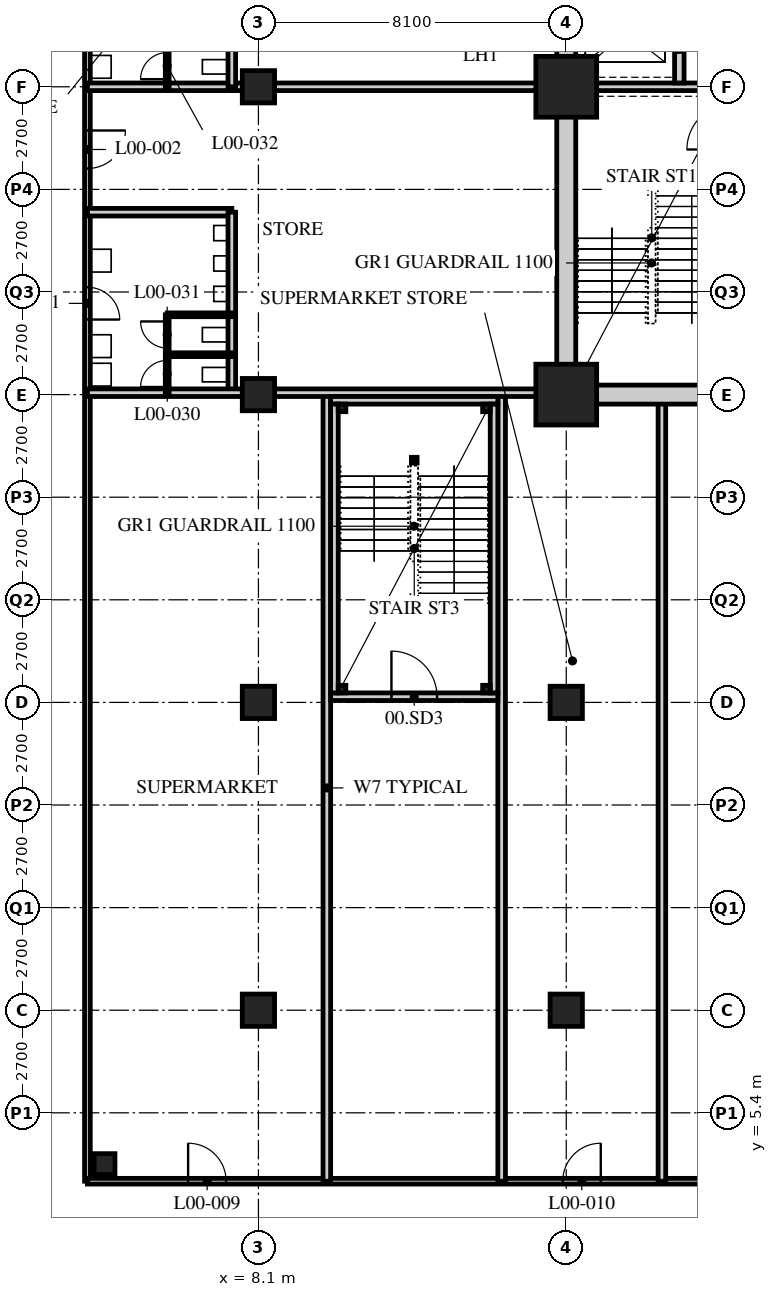
"""IFC4 building model, lengths in metres.
Left out: names, types, materials, properties, quantities, classifications, styles, units other than length and angle.
Written with IfcOpenShell. Run it as: python <this file> out.ifc"""

import sys

from ifc_helpers import new_model, si_unit, direction, frame, frame_2d, origin, origin_2d, place, context, subcontext, project, spatial, rectangle, hollow_rectangle, extrude, element, fill, save


model = new_model("IFC4")
c1 = context("Model", 3, precision=1e-05, world=origin(), true_north=direction((0.0, 1.0)))
c2 = subcontext(c1, "Body", "Model", "MODEL_VIEW")
j1 = project(units=[si_unit("LENGTHUNIT", "METRE"), si_unit("PLANEANGLEUNIT", "RADIAN")], contexts=[c1])
p1 = place(None, origin())
s1 = spatial("IfcSite", under=j1, at=p1, CompositionType="ELEMENT")
p2 = place(p1, origin())
s2 = spatial("IfcBuilding", under=s1, at=p2, CompositionType="ELEMENT")
p3 = place(p2, origin())
s3 = spatial("IfcBuildingStorey", under=s2, at=p3, CompositionType="ELEMENT", Elevation=0.0)
p4 = place(p3, frame((4.05, 4.05, 0.0), z_axis=(0.0, 0.0, 1.0), x_axis=(1.0, 0.0, 0.0)))
e1 = element("IfcColumn", 1, at=p4, inside=s3, PredefinedType="COLUMN", context=c2, shape_type="SweptSolid", body=[
    extrude(hollow_rectangle(XDim=0.55, YDim=0.55, WallThickness=0.05, at=origin_2d()), origin(), (0.0, 0.0, 1.0), 6.0),
])
for number, where, z_axis, x_axis in (
    (2, (8.1, 8.1, 0.0), (0.0, 0.0, 1.0), (1.0, 0.0, 0.0)),
    (3, (8.1, 16.2, 0.0), (0.0, 0.0, 1.0), (1.0, 0.0, 0.0)),
    (4, (8.1, 24.3, 0.0), (0.0, 0.0, 1.0), (1.0, 0.0, 0.0)),
    (5, (8.1, 32.4, 0.0), (0.0, 0.0, 1.0), (1.0, 0.0, 0.0)),
    (6, (16.2, 8.1, 0.0), (0.0, 0.0, 1.0), (1.0, 0.0, 0.0)),
    (7, (16.2, 16.2, 0.0), (0.0, 0.0, 1.0), (1.0, 0.0, 0.0)),
):
    element("IfcColumn", number, at=place(p3, frame(where, z_axis=z_axis, x_axis=x_axis)), inside=s3, PredefinedType="COLUMN", context=c2, shape_type="SweptSolid", body=[
        extrude(hollow_rectangle(XDim=0.85, YDim=0.85, WallThickness=0.085, at=origin_2d()), origin(), (0.0, 0.0, 1.0), 6.0),
    ])
for number, where, z_axis, x_axis in (
    (8, (16.2, 24.3, 0.0), (0.0, 0.0, 1.0), (1.0, 0.0, 0.0)),
    (9, (16.2, 32.4, 0.0), (0.0, 0.0, 1.0), (1.0, 0.0, 0.0)),
):
    element("IfcColumn", number, at=place(p3, frame(where, z_axis=z_axis, x_axis=x_axis)), inside=s3, PredefinedType="COLUMN", context=c2, shape_type="SweptSolid", body=[
        extrude(hollow_rectangle(XDim=1.6, YDim=1.6, WallThickness=0.15, at=origin_2d()), origin(), (0.0, 0.0, 1.0), 6.0),
    ])
p5 = place(p3, frame((3.6, 40.5, 0.0), z_axis=(0.0, 0.0, 1.0), x_axis=(0.0, -1.0, 0.0)))
e10 = element("IfcWall", 10, at=p5, inside=s3, PredefinedType="PARTITIONING", context=c2, shape_type="SweptSolid", body=[
    extrude(rectangle(XDim=36.9, YDim=0.15, at=frame_2d((18.45, 0.0))), origin(), (0.0, 0.0, 1.0), 5.75),
])
p6 = place(p5, frame((13.375, 0.0, 0.0)))
e11 = element("IfcOpeningElement", 11, at=p6, cuts=e10, PredefinedType="OPENING", context=c2, shape_type="SweptSolid", body=[
    extrude(rectangle(XDim=0.85, YDim=2.1, at=frame_2d((0.425, 1.05))), frame((0.0, 0.085, 0.0), z_axis=(0.0, -1.0, 0.0), x_axis=(1.0, 0.0, 0.0)), (0.0, 0.0, 1.0), 0.17),
])
p7 = place(p5, frame((9.25, 0.0, 0.0)))
e12 = element("IfcOpeningElement", 12, at=p7, cuts=e10, PredefinedType="OPENING", context=c2, shape_type="SweptSolid", body=[
    extrude(rectangle(XDim=1.0, YDim=2.1, at=frame_2d((0.5, 1.05))), frame((0.0, 0.085, 0.0), z_axis=(0.0, -1.0, 0.0), x_axis=(1.0, 0.0, 0.0)), (0.0, 0.0, 1.0), 0.17),
])
p8 = place(p5, frame((4.875, 0.0, 0.0)))
e13 = element("IfcOpeningElement", 13, at=p8, cuts=e10, PredefinedType="OPENING", context=c2, shape_type="SweptSolid", body=[
    extrude(rectangle(XDim=0.85, YDim=2.1, at=frame_2d((0.425, 1.05))), frame((0.0, 0.085, 0.0), z_axis=(0.0, -1.0, 0.0), x_axis=(1.0, 0.0, 0.0)), (0.0, 0.0, 1.0), 0.17),
])
p9 = place(p5, frame((0.75, 0.0, 0.0)))
e14 = element("IfcOpeningElement", 14, at=p9, cuts=e10, PredefinedType="OPENING", context=c2, shape_type="SweptSolid", body=[
    extrude(rectangle(XDim=1.0, YDim=2.1, at=frame_2d((0.5, 1.05))), frame((0.0, 0.085, 0.0), z_axis=(0.0, -1.0, 0.0), x_axis=(1.0, 0.0, 0.0)), (0.0, 0.0, 1.0), 0.17),
])
p10 = place(p3, frame((3.6, 3.6, 0.0), z_axis=(0.0, 0.0, 1.0), x_axis=(1.0, 0.0, 0.0)))
e15 = element("IfcWall", 15, at=p10, inside=s3, PredefinedType="PARTITIONING", context=c2, shape_type="SweptSolid", body=[
    extrude(rectangle(XDim=23.54, YDim=0.15, at=frame_2d((11.77, 0.0))), origin(), (0.0, 0.0, 1.0), 5.75),
])
p11 = place(p10, frame((2.65, 0.0, 0.0)))
e16 = element("IfcOpeningElement", 16, at=p11, cuts=e15, PredefinedType="OPENING", context=c2, shape_type="SweptSolid", body=[
    extrude(rectangle(XDim=1.0, YDim=2.1, at=frame_2d((0.5, 1.05))), frame((0.0, 0.085, 0.0), z_axis=(0.0, -1.0, 0.0), x_axis=(1.0, 0.0, 0.0)), (0.0, 0.0, 1.0), 0.17),
])
p12 = place(p10, frame((12.508, 0.0, 0.0)))
e17 = element("IfcOpeningElement", 17, at=p12, cuts=e15, PredefinedType="OPENING", context=c2, shape_type="SweptSolid", body=[
    extrude(rectangle(XDim=1.0, YDim=2.1, at=frame_2d((0.5, 1.05))), frame((0.0, 0.085, 0.0), z_axis=(0.0, -1.0, 0.0), x_axis=(1.0, 0.0, 0.0)), (0.0, 0.0, 1.0), 0.17),
])
p13 = place(p10, frame((16.725, 0.0, 0.0)))
e18 = element("IfcOpeningElement", 18, at=p13, cuts=e15, PredefinedType="OPENING", context=c2, shape_type="SweptSolid", body=[
    extrude(rectangle(XDim=1.0, YDim=2.1, at=frame_2d((0.5, 1.05))), frame((0.0, 0.085, 0.0), z_axis=(0.0, -1.0, 0.0), x_axis=(1.0, 0.0, 0.0)), (0.0, 0.0, 1.0), 0.17),
])
p14 = place(p10, frame((20.942, 0.0, 0.0)))
e19 = element("IfcOpeningElement", 19, at=p14, cuts=e15, PredefinedType="OPENING", context=c2, shape_type="SweptSolid", body=[
    extrude(rectangle(XDim=1.0, YDim=2.1, at=frame_2d((0.5, 1.05))), frame((0.0, 0.085, 0.0), z_axis=(0.0, -1.0, 0.0), x_axis=(1.0, 0.0, 0.0)), (0.0, 0.0, 1.0), 0.17),
])
p15 = place(p3, frame((3.6, 32.4, 0.0), z_axis=(0.0, 0.0, 1.0), x_axis=(1.0, 0.0, 0.0)))
e20 = element("IfcWall", 20, at=p15, inside=s3, PredefinedType="SOLIDWALL", context=c2, shape_type="SweptSolid", body=[
    extrude(rectangle(XDim=12.6, YDim=0.2, at=frame_2d((6.3, 0.0))), origin(), (0.0, 0.0, 1.0), 5.138),
])
p16 = place(p3, frame((3.6, 29.1, 0.0), z_axis=(0.0, 0.0, 1.0), x_axis=(1.0, 0.0, 0.0)))
e21 = element("IfcWall", 21, at=p16, inside=s3, PredefinedType="SOLIDWALL", context=c2, shape_type="SweptSolid", body=[
    extrude(rectangle(XDim=3.8, YDim=0.2, at=frame_2d((1.9, 0.0))), origin(), (0.0, 0.0, 1.0), 5.75),
])
p17 = place(p3, frame((7.4, 24.3, 0.0), z_axis=(0.0, 0.0, 1.0), x_axis=(0.0, 1.0, 0.0)))
e22 = element("IfcWall", 22, at=p17, inside=s3, PredefinedType="SOLIDWALL", context=c2, shape_type="SweptSolid", body=[
    extrude(rectangle(XDim=4.8, YDim=0.2, at=frame_2d((2.4, 0.0))), origin(), (0.0, 0.0, 1.0), 5.75),
])
p18 = place(p3, frame((7.4, 32.4, 0.0), z_axis=(0.0, 0.0, 1.0), x_axis=(0.0, 1.0, 0.0)))
e23 = element("IfcWall", 23, at=p18, inside=s3, PredefinedType="SOLIDWALL", context=c2, shape_type="SweptSolid", body=[
    extrude(rectangle(XDim=5.6, YDim=0.2, at=frame_2d((2.8, 0.0))), origin(), (0.0, 0.0, 1.0), 5.75),
])
for number, where, z_axis, x_axis in (
    (24, (9.9, 3.6, 0.0), (0.0, 0.0, 1.0), (0.0, 1.0, 0.0)),
    (25, (14.5, 3.6, 0.0), (0.0, 0.0, 1.0), (0.0, 1.0, 0.0)),
    (26, (18.717, 3.6, 0.0), (0.0, 0.0, 1.0), (0.0, 1.0, 0.0)),
):
    element("IfcWall", number, at=place(p3, frame(where, z_axis=z_axis, x_axis=x_axis)), inside=s3, PredefinedType="SOLIDWALL", context=c2, shape_type="SweptSolid", body=[
        extrude(rectangle(XDim=20.7, YDim=0.2, at=frame_2d((10.35, 0.0))), origin(), (0.0, 0.0, 1.0), 5.75),
    ])
p19 = place(p3, frame((3.6, 24.35, 0.0), z_axis=(0.0, 0.0, 1.0), x_axis=(1.0, 0.0, 0.0)))
e27 = element("IfcWall", 27, at=p19, inside=s3, PredefinedType="SOLIDWALL", context=c2, shape_type="SweptSolid", body=[
    extrude(rectangle(XDim=12.6, YDim=0.2, at=frame_2d((6.3, 0.0))), origin(), (0.0, 0.0, 1.0), 5.138),
])
p20 = place(p3, frame((5.7, 24.3, 0.0), z_axis=(0.0, 0.0, 1.0), x_axis=(0.0, 1.0, 0.0)))
e28 = element("IfcWall", 28, at=p20, inside=s3, PredefinedType="PARTITIONING", context=c2, shape_type="SweptSolid", body=[
    extrude(rectangle(XDim=2.1, YDim=0.1, at=frame_2d((1.05, 0.0))), origin(), (0.0, 0.0, 1.0), 5.75),
])
p21 = place(p20, frame((0.2, 0.0, 0.0)))
e29 = element("IfcOpeningElement", 29, at=p21, cuts=e28, PredefinedType="OPENING", context=c2, shape_type="SweptSolid", body=[
    extrude(rectangle(XDim=0.7, YDim=2.0, at=frame_2d((0.35, 1.0))), frame((0.0, 0.06, 0.0), z_axis=(0.0, -1.0, 0.0), x_axis=(1.0, 0.0, 0.0)), (0.0, 0.0, 1.0), 0.12),
])
p22 = place(p20, frame((1.225, 0.0, 0.0)))
e30 = element("IfcOpeningElement", 30, at=p22, cuts=e28, PredefinedType="OPENING", context=c2, shape_type="SweptSolid", body=[
    extrude(rectangle(XDim=0.7, YDim=2.0, at=frame_2d((0.35, 1.0))), frame((0.0, 0.06, 0.0), z_axis=(0.0, -1.0, 0.0), x_axis=(1.0, 0.0, 0.0)), (0.0, 0.0, 1.0), 0.12),
])
for number, where, z_axis, x_axis in (
    (31, (5.7, 25.35, 0.0), (0.0, 0.0, 1.0), (1.0, 0.0, 0.0)),
    (32, (5.7, 26.4, 0.0), (0.0, 0.0, 1.0), (1.0, 0.0, 0.0)),
):
    element("IfcWall", number, at=place(p3, frame(where, z_axis=z_axis, x_axis=x_axis)), inside=s3, PredefinedType="PARTITIONING", context=c2, shape_type="SweptSolid", body=[
        extrude(rectangle(XDim=1.7, YDim=0.1, at=frame_2d((0.85, 0.0))), origin(), (0.0, 0.0, 1.0), 5.75),
    ])
p23 = place(p3, frame((5.7, 32.4, 0.0), z_axis=(0.0, 0.0, 1.0), x_axis=(0.0, 1.0, 0.0)))
e33 = element("IfcWall", 33, at=p23, inside=s3, PredefinedType="PARTITIONING", context=c2, shape_type="SweptSolid", body=[
    extrude(rectangle(XDim=5.25, YDim=0.1, at=frame_2d((2.625, 0.0))), origin(), (0.0, 0.0, 1.0), 5.75),
])
p24 = place(p23, frame((0.2, 0.0, 0.0)))
e34 = element("IfcOpeningElement", 34, at=p24, cuts=e33, PredefinedType="OPENING", context=c2, shape_type="SweptSolid", body=[
    extrude(rectangle(XDim=0.7, YDim=2.0, at=frame_2d((0.35, 1.0))), frame((0.0, 0.06, 0.0), z_axis=(0.0, -1.0, 0.0), x_axis=(1.0, 0.0, 0.0)), (0.0, 0.0, 1.0), 0.12),
])
p25 = place(p23, frame((1.225, 0.0, 0.0)))
e35 = element("IfcOpeningElement", 35, at=p25, cuts=e33, PredefinedType="OPENING", context=c2, shape_type="SweptSolid", body=[
    extrude(rectangle(XDim=0.7, YDim=2.0, at=frame_2d((0.35, 1.0))), frame((0.0, 0.06, 0.0), z_axis=(0.0, -1.0, 0.0), x_axis=(1.0, 0.0, 0.0)), (0.0, 0.0, 1.0), 0.12),
])
p26 = place(p23, frame((2.275, 0.0, 0.0)))
e36 = element("IfcOpeningElement", 36, at=p26, cuts=e33, PredefinedType="OPENING", context=c2, shape_type="SweptSolid", body=[
    extrude(rectangle(XDim=0.7, YDim=2.0, at=frame_2d((0.35, 1.0))), frame((0.0, 0.06, 0.0), z_axis=(0.0, -1.0, 0.0), x_axis=(1.0, 0.0, 0.0)), (0.0, 0.0, 1.0), 0.12),
])
p27 = place(p23, frame((3.325, 0.0, 0.0)))
e37 = element("IfcOpeningElement", 37, at=p27, cuts=e33, PredefinedType="OPENING", context=c2, shape_type="SweptSolid", body=[
    extrude(rectangle(XDim=0.7, YDim=2.0, at=frame_2d((0.35, 1.0))), frame((0.0, 0.06, 0.0), z_axis=(0.0, -1.0, 0.0), x_axis=(1.0, 0.0, 0.0)), (0.0, 0.0, 1.0), 0.12),
])
p28 = place(p23, frame((4.375, 0.0, 0.0)))
e38 = element("IfcOpeningElement", 38, at=p28, cuts=e33, PredefinedType="OPENING", context=c2, shape_type="SweptSolid", body=[
    extrude(rectangle(XDim=0.7, YDim=2.0, at=frame_2d((0.35, 1.0))), frame((0.0, 0.06, 0.0), z_axis=(0.0, -1.0, 0.0), x_axis=(1.0, 0.0, 0.0)), (0.0, 0.0, 1.0), 0.12),
])
p29 = place(p3, frame((15.95, 24.3, 0.0), z_axis=(0.0, 0.0, 1.0), x_axis=(1.0, 0.0, 0.0)))
e39 = element("IfcWall", 39, at=p29, inside=s3, PredefinedType="SOLIDWALL", context=c2, shape_type="SweptSolid", body=[
    extrude(rectangle(XDim=24.8, YDim=0.5, at=frame_2d((12.4, 0.0))), origin(), (0.0, 0.0, 1.0), 5.1),
])
p30 = place(p29, frame((11.5, 0.0, 0.0)))
e40 = element("IfcOpeningElement", 40, at=p30, cuts=e39, PredefinedType="OPENING", context=c2, shape_type="SweptSolid", body=[
    extrude(rectangle(XDim=1.8, YDim=2.4, at=frame_2d((0.9, 1.2))), frame((0.0, 0.26, 0.0), z_axis=(0.0, -1.0, 0.0), x_axis=(1.0, 0.0, 0.0)), (0.0, 0.0, 1.0), 0.52),
])
p31 = place(p3, frame((16.2, 24.55, 0.0), z_axis=(0.0, 0.0, 1.0), x_axis=(0.0, 1.0, 0.0)))
e41 = element("IfcWall", 41, at=p31, inside=s3, PredefinedType="SOLIDWALL", context=c2, shape_type="SweptSolid", body=[
    extrude(rectangle(XDim=15.7, YDim=0.5, at=frame_2d((7.85, 0.0))), origin(), (0.0, 0.0, 1.0), 5.138),
])
p32 = place(p3, frame((16.45, 32.4, 0.0), z_axis=(0.0, 0.0, 1.0), x_axis=(1.0, 0.0, 0.0)))
e42 = element("IfcWall", 42, at=p32, inside=s3, PredefinedType="SOLIDWALL", context=c2, shape_type="SweptSolid", body=[
    extrude(rectangle(XDim=7.95, YDim=0.2, at=frame_2d((3.975, 0.0))), origin(), (0.0, 0.0, 1.0), 5.05),
])
p33 = place(p3, frame((19.175, 32.5, 0.0), z_axis=(0.0, 0.0, 1.0), x_axis=(0.0, 1.0, 0.0)))
e43 = element("IfcWall", 43, at=p33, inside=s3, PredefinedType="SOLIDWALL", context=c2, shape_type="SweptSolid", body=[
    extrude(rectangle(XDim=7.75, YDim=0.25, at=frame_2d((3.875, 0.0))), origin(), (0.0, 0.0, 1.0), 5.75),
])
p34 = place(p33, frame((0.8, 0.0, 0.0)))
e44 = element("IfcOpeningElement", 44, at=p34, cuts=e43, PredefinedType="OPENING", context=c2, shape_type="SweptSolid", body=[
    extrude(rectangle(XDim=1.1, YDim=2.4, at=frame_2d((0.55, 1.2))), frame((0.0, 0.135, 0.0), z_axis=(0.0, -1.0, 0.0), x_axis=(1.0, 0.0, 0.0)), (0.0, 0.0, 1.0), 0.27),
])
p35 = place(p33, frame((3.4, 0.0, 0.0)))
e45 = element("IfcOpeningElement", 45, at=p35, cuts=e43, PredefinedType="OPENING", context=c2, shape_type="SweptSolid", body=[
    extrude(rectangle(XDim=1.1, YDim=2.4, at=frame_2d((0.55, 1.2))), frame((0.0, 0.135, 0.0), z_axis=(0.0, -1.0, 0.0), x_axis=(1.0, 0.0, 0.0)), (0.0, 0.0, 1.0), 0.27),
])
p36 = place(p33, frame((6.0, 0.0, 0.0)))
e46 = element("IfcOpeningElement", 46, at=p36, cuts=e43, PredefinedType="OPENING", context=c2, shape_type="SweptSolid", body=[
    extrude(rectangle(XDim=1.1, YDim=2.4, at=frame_2d((0.55, 1.2))), frame((0.0, 0.135, 0.0), z_axis=(0.0, -1.0, 0.0), x_axis=(1.0, 0.0, 0.0)), (0.0, 0.0, 1.0), 0.27),
])
p37 = place(p3, frame((10.0, 16.35, 0.0), z_axis=(0.0, 0.0, 1.0), x_axis=(1.0, 0.0, 0.0)))
e47 = element("IfcWall", 47, at=p37, inside=s3, PredefinedType="SOLIDWALL", context=c2, shape_type="SweptSolid", body=[
    extrude(rectangle(XDim=4.4, YDim=0.2, at=frame_2d((2.2, 0.0))), origin(), (0.0, 0.0, 1.0), 5.138),
])
p38 = place(p37, frame((1.6, 0.0, 0.0)))
e48 = element("IfcOpeningElement", 48, at=p38, cuts=e47, PredefinedType="OPENING", context=c2, shape_type="SweptSolid", body=[
    extrude(rectangle(XDim=1.2, YDim=2.1, at=frame_2d((0.6, 1.05))), frame((0.0, 0.11, 0.0), z_axis=(0.0, -1.0, 0.0), x_axis=(1.0, 0.0, 0.0)), (0.0, 0.0, 1.0), 0.22),
])
p39 = place(p3, frame((10.0, 24.15, 0.0), z_axis=(0.0, 0.0, 1.0), x_axis=(1.0, 0.0, 0.0)))
e49 = element("IfcWall", 49, at=p39, inside=s3, PredefinedType="SOLIDWALL", context=c2, shape_type="SweptSolid", body=[
    extrude(rectangle(XDim=4.4, YDim=0.2, at=frame_2d((2.2, 0.0))), origin(), (0.0, 0.0, 1.0), 5.138),
])
for number, where, z_axis, x_axis in (
    (50, (10.1, 16.45, 0.0), (0.0, 0.0, 1.0), (0.0, 1.0, 0.0)),
    (51, (14.3, 16.45, 0.0), (0.0, 0.0, 1.0), (0.0, 1.0, 0.0)),
):
    element("IfcWall", number, at=place(p3, frame(where, z_axis=z_axis, x_axis=x_axis)), inside=s3, PredefinedType="SOLIDWALL", context=c2, shape_type="SweptSolid", body=[
        extrude(rectangle(XDim=7.6, YDim=0.2, at=frame_2d((3.8, 0.0))), origin(), (0.0, 0.0, 1.0), 5.75),
    ])
for number, where, z_axis, x_axis in (
    (52, (10.3, 23.95, 0.0), (0.0, 0.0, 1.0), (1.0, 0.0, 0.0)),
    (53, (14.1, 23.95, 0.0), (0.0, 0.0, 1.0), (1.0, 0.0, 0.0)),
    (54, (10.3, 16.55, 0.0), (0.0, 0.0, 1.0), (1.0, 0.0, 0.0)),
    (55, (14.1, 16.55, 0.0), (0.0, 0.0, 1.0), (1.0, 0.0, 0.0)),
):
    element("IfcColumn", number, at=place(p3, frame(where, z_axis=z_axis, x_axis=x_axis)), inside=s3, PredefinedType="COLUMN", context=c2, shape_type="SweptSolid", body=[
        extrude(hollow_rectangle(XDim=0.2, YDim=0.2, WallThickness=0.012, at=origin_2d()), origin(), (0.0, 0.0, 1.0), 6.0),
    ])
p40 = place(p3, frame((12.2, 22.575, 0.0), z_axis=(0.0, 0.0, 1.0), x_axis=(1.0, 0.0, 0.0)))
e56 = element("IfcColumn", 56, at=p40, inside=s3, PredefinedType="COLUMN", context=c2, shape_type="SweptSolid", body=[
    extrude(hollow_rectangle(XDim=0.15, YDim=0.15, WallThickness=0.01, at=origin_2d()), origin(), (0.0, 0.0, 1.0), 6.0),
])
p41 = place(p6, origin())
e57 = element("IfcDoor", 57, at=p41, inside=s3, OperationType="SINGLE_SWING_RIGHT", PredefinedType="DOOR", context=c2, shape_type="SweptSolid", body=[
    extrude(rectangle(XDim=0.85, YDim=2.1, at=frame_2d((0.425, 1.05))), frame((0.0, 0.025, 0.0), z_axis=(0.0, -1.0, 0.0), x_axis=(1.0, 0.0, 0.0)), (0.0, 0.0, 1.0), 0.05),
])
fill(e11, e57)
p42 = place(p7, origin())
e58 = element("IfcDoor", 58, at=p42, inside=s3, OperationType="SINGLE_SWING_LEFT", PredefinedType="DOOR", context=c2, shape_type="SweptSolid", body=[
    extrude(rectangle(XDim=1.0, YDim=2.1, at=frame_2d((0.5, 1.05))), frame((0.0, 0.025, 0.0), z_axis=(0.0, -1.0, 0.0), x_axis=(1.0, 0.0, 0.0)), (0.0, 0.0, 1.0), 0.05),
])
fill(e12, e58)
p43 = place(p11, origin())
e59 = element("IfcDoor", 59, at=p43, inside=s3, OperationType="SINGLE_SWING_LEFT", PredefinedType="DOOR", context=c2, shape_type="SweptSolid", body=[
    extrude(rectangle(XDim=1.0, YDim=2.1, at=frame_2d((0.5, 1.05))), frame((0.0, 0.025, 0.0), z_axis=(0.0, -1.0, 0.0), x_axis=(1.0, 0.0, 0.0)), (0.0, 0.0, 1.0), 0.05),
])
fill(e16, e59)
p44 = place(p12, origin())
e60 = element("IfcDoor", 60, at=p44, inside=s3, OperationType="SINGLE_SWING_RIGHT", PredefinedType="DOOR", context=c2, shape_type="SweptSolid", body=[
    extrude(rectangle(XDim=1.0, YDim=2.1, at=frame_2d((0.5, 1.05))), frame((0.0, 0.025, 0.0), z_axis=(0.0, -1.0, 0.0), x_axis=(1.0, 0.0, 0.0)), (0.0, 0.0, 1.0), 0.05),
])
fill(e17, e60)
p45 = place(p21, origin())
e61 = element("IfcDoor", 61, at=p45, inside=s3, OperationType="SINGLE_SWING_LEFT", PredefinedType="DOOR", context=c2, shape_type="SweptSolid", body=[
    extrude(rectangle(XDim=0.7, YDim=2.0, at=frame_2d((0.35, 1.0))), frame((0.0, 0.025, 0.0), z_axis=(0.0, -1.0, 0.0), x_axis=(1.0, 0.0, 0.0)), (0.0, 0.0, 1.0), 0.05),
])
fill(e29, e61)
p46 = place(p22, origin())
e62 = element("IfcDoor", 62, at=p46, inside=s3, OperationType="SINGLE_SWING_RIGHT", PredefinedType="DOOR", context=c2, shape_type="SweptSolid", body=[
    extrude(rectangle(XDim=0.7, YDim=2.0, at=frame_2d((0.35, 1.0))), frame((0.0, 0.025, 0.0), z_axis=(0.0, -1.0, 0.0), x_axis=(1.0, 0.0, 0.0)), (0.0, 0.0, 1.0), 0.05),
])
fill(e30, e62)
p47 = place(p24, origin())
e63 = element("IfcDoor", 63, at=p47, inside=s3, OperationType="SINGLE_SWING_LEFT", PredefinedType="DOOR", context=c2, shape_type="SweptSolid", body=[
    extrude(rectangle(XDim=0.7, YDim=2.0, at=frame_2d((0.35, 1.0))), frame((0.0, 0.025, 0.0), z_axis=(0.0, -1.0, 0.0), x_axis=(1.0, 0.0, 0.0)), (0.0, 0.0, 1.0), 0.05),
])
fill(e34, e63)
p48 = place(p34, origin())
e64 = element("IfcDoor", 64, at=p48, inside=s3, OperationType="DOUBLE_DOOR_SLIDING", PredefinedType="DOOR", context=c2, shape_type="SweptSolid", body=[
    extrude(rectangle(XDim=1.1, YDim=2.4, at=frame_2d((0.55, 1.2))), frame((0.0, 0.025, 0.0), z_axis=(0.0, -1.0, 0.0), x_axis=(1.0, 0.0, 0.0)), (0.0, 0.0, 1.0), 0.05),
])
fill(e44, e64)
p49 = place(p38, origin())
e65 = element("IfcDoor", 65, at=p49, inside=s3, OperationType="SINGLE_SWING_LEFT", PredefinedType="DOOR", context=c2, shape_type="SweptSolid", body=[
    extrude(rectangle(XDim=1.2, YDim=2.1, at=frame_2d((0.6, 1.05))), frame((0.0, 0.025, 0.0), z_axis=(0.0, -1.0, 0.0), x_axis=(1.0, 0.0, 0.0)), (0.0, 0.0, 1.0), 0.05),
])
fill(e48, e65)
save(model, sys.argv[1])
